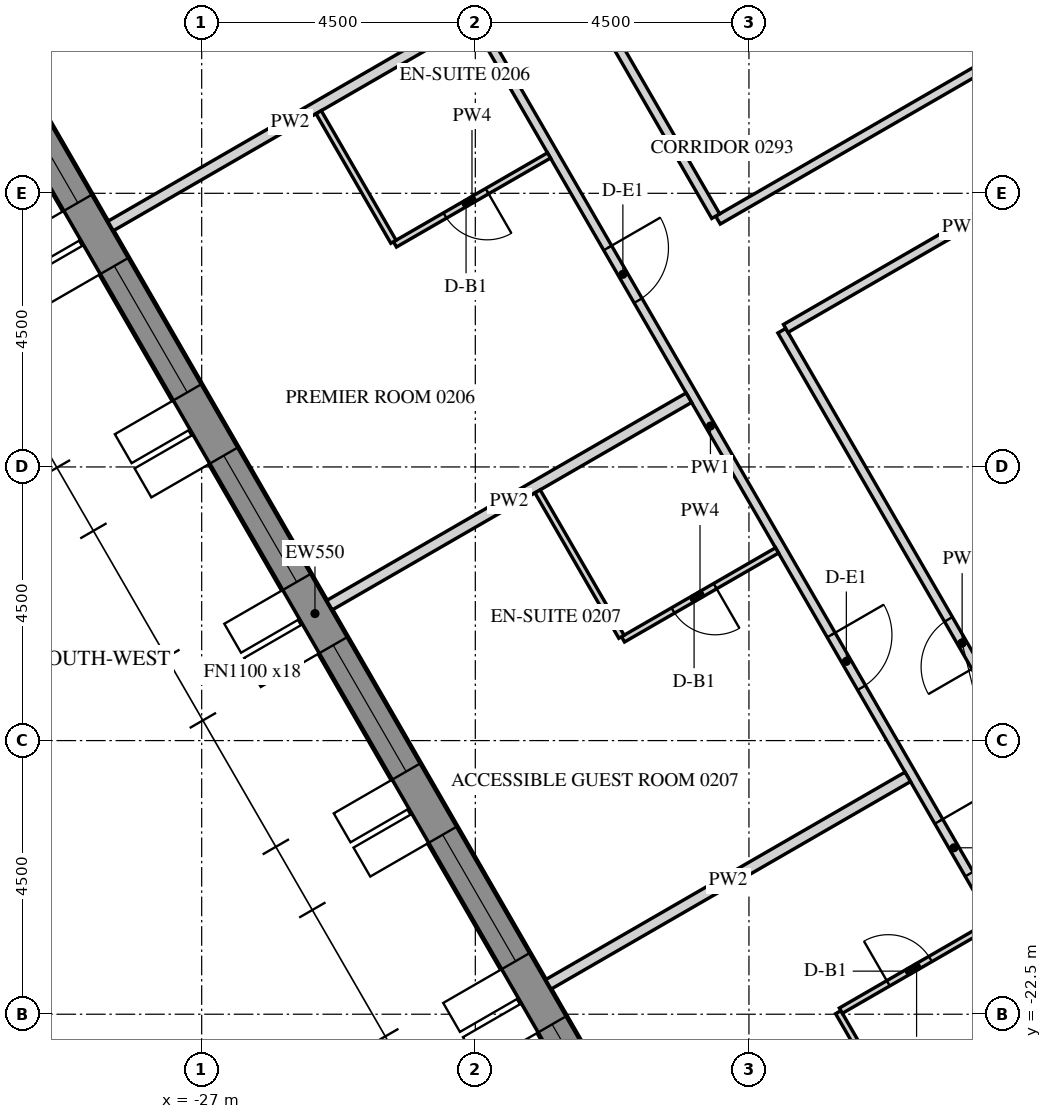
"""IFC4 building model, lengths in metres.
Left out: names, types, materials, properties, quantities, classifications, styles, units other than length and angle.
Written with IfcOpenShell. Run it as: python <this file> out.ifc"""

import sys

from ifc_helpers import new_model, si_unit, direction, frame, frame_2d, origin, place, context, subcontext, project, spatial, polyline, rectangle, outline, extrude, element, fill, save


model = new_model("IFC4")
c1 = context("Model", 3, precision=1e-05, world=origin(), true_north=direction((0.0, 1.0)))
c2 = subcontext(c1, "Body", "Model", "MODEL_VIEW")
j1 = project(units=[si_unit("LENGTHUNIT", "METRE"), si_unit("PLANEANGLEUNIT", "RADIAN")], contexts=[c1])
p1 = place(None, origin())
s1 = spatial("IfcSite", under=j1, at=p1, CompositionType="ELEMENT")
p2 = place(p1, origin())
s2 = spatial("IfcBuilding", under=s1, at=p2, CompositionType="ELEMENT")
p3 = place(p2, frame((0.0, 0.0, 49.2)))
s3 = spatial("IfcBuildingStorey", under=s2, at=p3, CompositionType="ELEMENT", Elevation=49.2)
p4 = place(p3, frame((-32.655, -2.89, -0.15), z_axis=(0.0, 0.0, 1.0), x_axis=(0.499997711317, -0.866026725152, 0.0)))
e1 = element("IfcWall", 1, at=p4, inside=s3, PredefinedType="SOLIDWALL", context=c2, shape_type="SweptSolid", body=[
    extrude(outline(polyline([(-0.022, -0.275), (30.097, -0.275), (30.045, 0.275), (0.022, 0.275), (-0.022, -0.275)])), origin(), (0.0, 0.0, 1.0), 3.9),
])
p5 = place(p4, frame((1.236, 0.0, 1.05)))
e2 = element("IfcOpeningElement", 2, at=p5, cuts=e1, PredefinedType="OPENING", context=c2, shape_type="SweptSolid", body=[
    extrude(rectangle(XDim=2.4, YDim=2.4, at=frame_2d((1.2, 1.2))), frame((0.0, 0.285, 0.0), z_axis=(0.0, -1.0, 0.0), x_axis=(1.0, 0.0, 0.0)), (0.0, 0.0, 1.0), 0.57),
])
p6 = place(p4, frame((4.835, 0.0, 1.05)))
e3 = element("IfcOpeningElement", 3, at=p6, cuts=e1, PredefinedType="OPENING", context=c2, shape_type="SweptSolid", body=[
    extrude(rectangle(XDim=2.4, YDim=2.4, at=frame_2d((1.2, 1.2))), frame((0.0, 0.285, 0.0), z_axis=(0.0, -1.0, 0.0), x_axis=(1.0, 0.0, 0.0)), (0.0, 0.0, 1.0), 0.57),
])
p7 = place(p4, frame((8.436, 0.0, 1.05)))
e4 = element("IfcOpeningElement", 4, at=p7, cuts=e1, PredefinedType="OPENING", context=c2, shape_type="SweptSolid", body=[
    extrude(rectangle(XDim=2.4, YDim=2.4, at=frame_2d((1.2, 1.2))), frame((0.0, 0.285, 0.0), z_axis=(0.0, -1.0, 0.0), x_axis=(1.0, 0.0, 0.0)), (0.0, 0.0, 1.0), 0.57),
])
p8 = place(p4, frame((12.035, 0.0, 1.05)))
e5 = element("IfcOpeningElement", 5, at=p8, cuts=e1, PredefinedType="OPENING", context=c2, shape_type="SweptSolid", body=[
    extrude(rectangle(XDim=2.4, YDim=2.4, at=frame_2d((1.2, 1.2))), frame((0.0, 0.285, 0.0), z_axis=(0.0, -1.0, 0.0), x_axis=(1.0, 0.0, 0.0)), (0.0, 0.0, 1.0), 0.57),
])
p9 = place(p4, frame((15.635, 0.0, 1.05)))
e6 = element("IfcOpeningElement", 6, at=p9, cuts=e1, PredefinedType="OPENING", context=c2, shape_type="SweptSolid", body=[
    extrude(rectangle(XDim=2.4, YDim=2.4, at=frame_2d((1.2, 1.2))), frame((0.0, 0.285, 0.0), z_axis=(0.0, -1.0, 0.0), x_axis=(1.0, 0.0, 0.0)), (0.0, 0.0, 1.0), 0.57),
])
p10 = place(p4, frame((19.236, 0.0, 1.05)))
e7 = element("IfcOpeningElement", 7, at=p10, cuts=e1, PredefinedType="OPENING", context=c2, shape_type="SweptSolid", body=[
    extrude(rectangle(XDim=2.4, YDim=2.4, at=frame_2d((1.2, 1.2))), frame((0.0, 0.285, 0.0), z_axis=(0.0, -1.0, 0.0), x_axis=(1.0, 0.0, 0.0)), (0.0, 0.0, 1.0), 0.57),
])
p11 = place(p4, frame((22.835, 0.0, 1.05)))
e8 = element("IfcOpeningElement", 8, at=p11, cuts=e1, PredefinedType="OPENING", context=c2, shape_type="SweptSolid", body=[
    extrude(rectangle(XDim=2.4, YDim=2.4, at=frame_2d((1.2, 1.2))), frame((0.0, 0.285, 0.0), z_axis=(0.0, -1.0, 0.0), x_axis=(1.0, 0.0, 0.0)), (0.0, 0.0, 1.0), 0.57),
])
p12 = place(p4, frame((26.436, 0.0, 1.05)))
e9 = element("IfcOpeningElement", 9, at=p12, cuts=e1, PredefinedType="OPENING", context=c2, shape_type="SweptSolid", body=[
    extrude(rectangle(XDim=2.4, YDim=2.4, at=frame_2d((1.2, 1.2))), frame((0.0, 0.285, 0.0), z_axis=(0.0, -1.0, 0.0), x_axis=(1.0, 0.0, 0.0)), (0.0, 0.0, 1.0), 0.57),
])
p13 = place(p3, frame((-15.819, 0.0, -0.15), z_axis=(0.0, 0.0, 1.0), x_axis=(0.499999880136, -0.866025472988, 0.0)))
e10 = element("IfcWall", 10, at=p13, inside=s3, PredefinedType="SHEAR", context=c2, shape_type="SweptSolid", body=[
    extrude(outline(polyline([(-0.173, -0.3), (15.993, -0.3), (15.646, 0.3), (0.173, 0.3), (-0.173, -0.3)])), origin(), (0.0, 0.0, 1.0), 3.9),
])
p14 = place(p13, frame((6.981, 0.0, 0.15)))
e11 = element("IfcOpeningElement", 11, at=p14, cuts=e10, PredefinedType="OPENING", context=c2, shape_type="SweptSolid", body=[
    extrude(rectangle(XDim=1.8, YDim=2.4, at=frame_2d((0.9, 1.2))), frame((0.0, 0.31, 0.0), z_axis=(0.0, -1.0, 0.0), x_axis=(1.0, 0.0, 0.0)), (0.0, 0.0, 1.0), 0.62),
])
p15 = place(p3, frame((-24.783, -2.175, 0.0), z_axis=(0.0, 0.0, 1.0), x_axis=(0.500001098408, -0.866024769617, 0.0)))
e12 = element("IfcWall", 12, at=p15, inside=s3, PredefinedType="PARTITIONING", context=c2, shape_type="SweptSolid", body=[
    extrude(rectangle(XDim=24.599, YDim=0.15, at=frame_2d((12.299, 0.0))), origin(), (0.0, 0.0, 1.0), 2.988),
])
p16 = place(p15, frame((2.816, 0.0, 0.0)))
e13 = element("IfcOpeningElement", 13, at=p16, cuts=e12, PredefinedType="OPENING", context=c2, shape_type="SweptSolid", body=[
    extrude(rectangle(XDim=1.0, YDim=2.1, at=frame_2d((0.5, 1.05))), frame((0.0, 0.085, 0.0), z_axis=(0.0, -1.0, 0.0), x_axis=(1.0, 0.0, 0.0)), (0.0, 0.0, 1.0), 0.17),
])
p17 = place(p15, frame((8.919, 0.0, 0.0)))
e14 = element("IfcOpeningElement", 14, at=p17, cuts=e12, PredefinedType="OPENING", context=c2, shape_type="SweptSolid", body=[
    extrude(rectangle(XDim=1.0, YDim=2.1, at=frame_2d((0.5, 1.05))), frame((0.0, 0.085, 0.0), z_axis=(0.0, -1.0, 0.0), x_axis=(1.0, 0.0, 0.0)), (0.0, 0.0, 1.0), 0.17),
])
p18 = place(p15, frame((16.269, 0.0, 0.0)))
e15 = element("IfcOpeningElement", 15, at=p18, cuts=e12, PredefinedType="OPENING", context=c2, shape_type="SweptSolid", body=[
    extrude(rectangle(XDim=1.0, YDim=2.1, at=frame_2d((0.5, 1.05))), frame((0.0, 0.085, 0.0), z_axis=(0.0, -1.0, 0.0), x_axis=(1.0, 0.0, 0.0)), (0.0, 0.0, 1.0), 0.17),
])
p19 = place(p15, frame((19.809, 0.0, 0.0)))
e16 = element("IfcOpeningElement", 16, at=p19, cuts=e12, PredefinedType="OPENING", context=c2, shape_type="SweptSolid", body=[
    extrude(rectangle(XDim=1.0, YDim=2.1, at=frame_2d((0.5, 1.05))), frame((0.0, 0.085, 0.0), z_axis=(0.0, -1.0, 0.0), x_axis=(1.0, 0.0, 0.0)), (0.0, 0.0, 1.0), 0.17),
])
p20 = place(p3, frame((-12.664, -6.066, 0.0), z_axis=(0.0, 0.0, 1.0), x_axis=(-0.866026575979, -0.499997969693, 0.0)))
e17 = element("IfcWall", 17, at=p20, inside=s3, PredefinedType="PARTITIONING", context=c2, shape_type="SweptSolid", body=[
    extrude(rectangle(XDim=6.75, YDim=0.15, at=frame_2d((3.375, 0.0))), origin(), (0.0, 0.0, 1.0), 2.988),
])
p21 = place(p3, frame((-18.547, -9.376, 0.0), z_axis=(0.0, 0.0, 1.0), x_axis=(-0.500002473902, 0.866023975472, 0.0)))
e18 = element("IfcWall", 18, at=p21, inside=s3, PredefinedType="PARTITIONING", context=c2, shape_type="SweptSolid", body=[
    extrude(rectangle(XDim=8.679, YDim=0.15, at=frame_2d((4.34, 0.0))), origin(), (0.0, 0.0, 1.0), 2.988),
])
p22 = place(p21, frame((3.89, 0.0, 0.0)))
e19 = element("IfcOpeningElement", 19, at=p22, cuts=e18, PredefinedType="OPENING", context=c2, shape_type="SweptSolid", body=[
    extrude(rectangle(XDim=0.9, YDim=2.1, at=frame_2d((0.45, 1.05))), frame((0.0, 0.085, 0.0), z_axis=(0.0, -1.0, 0.0), x_axis=(1.0, 0.0, 0.0)), (0.0, 0.0, 1.0), 0.17),
])
p23 = place(p3, frame((-11.529, -21.532, 0.0), z_axis=(0.0, 0.0, 1.0), x_axis=(-0.499990893337, 0.866030661455, 0.0)))
e20 = element("IfcWall", 20, at=p23, inside=s3, PredefinedType="PARTITIONING", context=c2, shape_type="SweptSolid", body=[
    extrude(rectangle(XDim=11.862, YDim=0.15, at=frame_2d((5.931, 0.0))), origin(), (0.0, 0.0, 1.0), 2.988),
])
p24 = place(p23, frame((5.481, 0.0, 0.0)))
e21 = element("IfcOpeningElement", 21, at=p24, cuts=e20, PredefinedType="OPENING", context=c2, shape_type="SweptSolid", body=[
    extrude(rectangle(XDim=0.9, YDim=2.1, at=frame_2d((0.45, 1.05))), frame((0.0, 0.085, 0.0), z_axis=(0.0, -1.0, 0.0), x_axis=(1.0, 0.0, 0.0)), (0.0, 0.0, 1.0), 0.17),
])
p25 = place(p3, frame((-17.395, -11.222, 0.0), z_axis=(0.0, 0.0, 1.0), x_axis=(0.86601747984, 0.500013724423, 0.0)))
e22 = element("IfcWall", 22, at=p25, inside=s3, PredefinedType="PARTITIONING", context=c2, shape_type="SweptSolid", body=[
    extrude(rectangle(XDim=6.675, YDim=0.15, at=frame_2d((3.337, 0.0))), origin(), (0.0, 0.0, 1.0), 2.988),
])
p26 = place(p3, frame((-28.499, -9.538, 0.0), z_axis=(0.0, 0.0, 1.0), x_axis=(0.866035472144, 0.499982560684, 0.0)))
e23 = element("IfcWall", 23, at=p26, inside=s3, PredefinedType="PARTITIONING", context=c2, shape_type="SweptSolid", body=[
    extrude(rectangle(XDim=6.825, YDim=0.18, at=frame_2d((3.413, 0.0))), origin(), (0.0, 0.0, 1.0), 2.988),
])
p27 = place(p3, frame((-21.288, -8.378, 0.0), z_axis=(0.0, 0.0, 1.0), x_axis=(-0.866046596414, -0.499963291492, 0.0)))
e24 = element("IfcWall", 24, at=p27, inside=s3, PredefinedType="PARTITIONING", context=c2, shape_type="SweptSolid", body=[
    extrude(rectangle(XDim=2.925, YDim=0.1, at=frame_2d((1.462, 0.0))), origin(), (0.0, 0.0, 1.0), 2.988),
])
p28 = place(p27, frame((1.175, 0.0, 0.0)))
e25 = element("IfcOpeningElement", 25, at=p28, cuts=e24, PredefinedType="OPENING", context=c2, shape_type="SweptSolid", body=[
    extrude(rectangle(XDim=0.8, YDim=2.1, at=frame_2d((0.4, 1.05))), frame((0.0, 0.06, 0.0), z_axis=(0.0, -1.0, 0.0), x_axis=(1.0, 0.0, 0.0)), (0.0, 0.0, 1.0), 0.12),
])
p29 = place(p3, frame((-23.846, -9.797, 0.0), z_axis=(0.0, 0.0, 1.0), x_axis=(-0.499960120811, 0.86604842682, 0.0)))
e26 = element("IfcWall", 26, at=p29, inside=s3, PredefinedType="PARTITIONING", context=c2, shape_type="SweptSolid", body=[
    extrude(rectangle(XDim=2.46, YDim=0.1, at=frame_2d((1.23, 0.0))), origin(), (0.0, 0.0, 1.0), 2.988),
])
p30 = place(p3, frame((-24.899, -15.774, 0.0), z_axis=(0.0, 0.0, 1.0), x_axis=(0.866035472144, 0.499982560684, 0.0)))
e27 = element("IfcWall", 27, at=p30, inside=s3, PredefinedType="PARTITIONING", context=c2, shape_type="SweptSolid", body=[
    extrude(rectangle(XDim=6.825, YDim=0.18, at=frame_2d((3.413, 0.0))), origin(), (0.0, 0.0, 1.0), 2.988),
])
p31 = place(p3, frame((-17.538, -14.873, 0.0), z_axis=(0.0, 0.0, 1.0), x_axis=(-0.866046596414, -0.499963291492, 0.0)))
e28 = element("IfcWall", 28, at=p31, inside=s3, PredefinedType="PARTITIONING", context=c2, shape_type="SweptSolid", body=[
    extrude(rectangle(XDim=2.925, YDim=0.1, at=frame_2d((1.462, 0.0))), origin(), (0.0, 0.0, 1.0), 2.988),
])
p32 = place(p31, frame((1.175, 0.0, 0.0)))
e29 = element("IfcOpeningElement", 29, at=p32, cuts=e28, PredefinedType="OPENING", context=c2, shape_type="SweptSolid", body=[
    extrude(rectangle(XDim=0.8, YDim=2.1, at=frame_2d((0.4, 1.05))), frame((0.0, 0.06, 0.0), z_axis=(0.0, -1.0, 0.0), x_axis=(1.0, 0.0, 0.0)), (0.0, 0.0, 1.0), 0.12),
])
p33 = place(p3, frame((-20.096, -16.292, 0.0), z_axis=(0.0, 0.0, 1.0), x_axis=(-0.499982807329, 0.86603532975, 0.0)))
e30 = element("IfcWall", 30, at=p33, inside=s3, PredefinedType="PARTITIONING", context=c2, shape_type="SweptSolid", body=[
    extrude(rectangle(XDim=2.76, YDim=0.1, at=frame_2d((1.38, 0.0))), origin(), (0.0, 0.0, 1.0), 2.988),
])
p34 = place(p3, frame((-21.299, -22.009, 0.0), z_axis=(0.0, 0.0, 1.0), x_axis=(0.866019982719, 0.500009389444, 0.0)))
e31 = element("IfcWall", 31, at=p34, inside=s3, PredefinedType="PARTITIONING", context=c2, shape_type="SweptSolid", body=[
    extrude(rectangle(XDim=6.825, YDim=0.18, at=frame_2d((3.413, 0.0))), origin(), (0.0, 0.0, 1.0), 2.988),
])
p35 = place(p3, frame((-15.106, -24.935, 0.0), z_axis=(0.0, 0.0, 1.0), x_axis=(-0.500036373335, 0.866004402611, 0.0)))
e32 = element("IfcWall", 32, at=p35, inside=s3, PredefinedType="PARTITIONING", context=c2, shape_type="SweptSolid", body=[
    extrude(rectangle(XDim=2.85, YDim=0.1, at=frame_2d((1.425, 0.0))), origin(), (0.0, 0.0, 1.0), 2.988),
])
p36 = place(p3, frame((-16.488, -22.441, 0.0), z_axis=(0.0, 0.0, 1.0), x_axis=(0.866018712932, 0.500011588718, 0.0)))
e33 = element("IfcWall", 33, at=p36, inside=s3, PredefinedType="PARTITIONING", context=c2, shape_type="SweptSolid", body=[
    extrude(rectangle(XDim=2.875, YDim=0.1, at=frame_2d((1.438, 0.0))), origin(), (0.0, 0.0, 1.0), 2.988),
])
p37 = place(p36, frame((0.9, 0.0, 0.0)))
e34 = element("IfcOpeningElement", 34, at=p37, cuts=e33, PredefinedType="OPENING", context=c2, shape_type="SweptSolid", body=[
    extrude(rectangle(XDim=0.8, YDim=2.1, at=frame_2d((0.4, 1.05))), frame((0.0, 0.06, 0.0), z_axis=(0.0, -1.0, 0.0), x_axis=(1.0, 0.0, 0.0)), (0.0, 0.0, 1.0), 0.12),
])
p38 = place(p6, frame((0.0, 0.205, 0.0)))
e35 = element("IfcWindow", 35, at=p38, inside=s3, PartitioningType="DOUBLE_PANEL_VERTICAL", PredefinedType="WINDOW", context=c2, shape_type="SweptSolid", body=[
    extrude(rectangle(XDim=2.4, YDim=2.4, at=frame_2d((1.2, 1.2))), frame((0.0, 0.03, 0.0), z_axis=(0.0, -1.0, 0.0), x_axis=(1.0, 0.0, 0.0)), (0.0, 0.0, 1.0), 0.06),
])
fill(e3, e35)
p39 = place(p7, frame((0.0, 0.205, 0.0)))
e36 = element("IfcWindow", 36, at=p39, inside=s3, PartitioningType="DOUBLE_PANEL_VERTICAL", PredefinedType="WINDOW", context=c2, shape_type="SweptSolid", body=[
    extrude(rectangle(XDim=2.4, YDim=2.4, at=frame_2d((1.2, 1.2))), frame((0.0, 0.03, 0.0), z_axis=(0.0, -1.0, 0.0), x_axis=(1.0, 0.0, 0.0)), (0.0, 0.0, 1.0), 0.06),
])
fill(e4, e36)
p40 = place(p8, frame((0.0, 0.205, 0.0)))
e37 = element("IfcWindow", 37, at=p40, inside=s3, PartitioningType="DOUBLE_PANEL_VERTICAL", PredefinedType="WINDOW", context=c2, shape_type="SweptSolid", body=[
    extrude(rectangle(XDim=2.4, YDim=2.4, at=frame_2d((1.2, 1.2))), frame((0.0, 0.03, 0.0), z_axis=(0.0, -1.0, 0.0), x_axis=(1.0, 0.0, 0.0)), (0.0, 0.0, 1.0), 0.06),
])
fill(e5, e37)
p41 = place(p9, frame((0.0, 0.205, 0.0)))
e38 = element("IfcWindow", 38, at=p41, inside=s3, PartitioningType="DOUBLE_PANEL_VERTICAL", PredefinedType="WINDOW", context=c2, shape_type="SweptSolid", body=[
    extrude(rectangle(XDim=2.4, YDim=2.4, at=frame_2d((1.2, 1.2))), frame((0.0, 0.03, 0.0), z_axis=(0.0, -1.0, 0.0), x_axis=(1.0, 0.0, 0.0)), (0.0, 0.0, 1.0), 0.06),
])
fill(e6, e38)
p42 = place(p10, frame((0.0, 0.205, 0.0)))
e39 = element("IfcWindow", 39, at=p42, inside=s3, PartitioningType="DOUBLE_PANEL_VERTICAL", PredefinedType="WINDOW", context=c2, shape_type="SweptSolid", body=[
    extrude(rectangle(XDim=2.4, YDim=2.4, at=frame_2d((1.2, 1.2))), frame((0.0, 0.03, 0.0), z_axis=(0.0, -1.0, 0.0), x_axis=(1.0, 0.0, 0.0)), (0.0, 0.0, 1.0), 0.06),
])
fill(e7, e39)
p43 = place(p11, frame((0.0, 0.205, 0.0)))
e40 = element("IfcWindow", 40, at=p43, inside=s3, PartitioningType="DOUBLE_PANEL_VERTICAL", PredefinedType="WINDOW", context=c2, shape_type="SweptSolid", body=[
    extrude(rectangle(XDim=2.4, YDim=2.4, at=frame_2d((1.2, 1.2))), frame((0.0, 0.03, 0.0), z_axis=(0.0, -1.0, 0.0), x_axis=(1.0, 0.0, 0.0)), (0.0, 0.0, 1.0), 0.06),
])
fill(e8, e40)
p44 = place(p17, origin())
e41 = element("IfcDoor", 41, at=p44, inside=s3, OperationType="SINGLE_SWING_LEFT", PredefinedType="DOOR", context=c2, shape_type="SweptSolid", body=[
    extrude(rectangle(XDim=1.0, YDim=2.1, at=frame_2d((0.5, 1.05))), frame((0.0, 0.025, 0.0), z_axis=(0.0, -1.0, 0.0), x_axis=(1.0, 0.0, 0.0)), (0.0, 0.0, 1.0), 0.05),
])
fill(e14, e41)
p45 = place(p28, origin())
e42 = element("IfcDoor", 42, at=p45, inside=s3, OperationType="SINGLE_SWING_LEFT", PredefinedType="DOOR", context=c2, shape_type="SweptSolid", body=[
    extrude(rectangle(XDim=0.8, YDim=2.1, at=frame_2d((0.4, 1.05))), frame((0.0, 0.025, 0.0), z_axis=(0.0, -1.0, 0.0), x_axis=(1.0, 0.0, 0.0)), (0.0, 0.0, 1.0), 0.05),
])
fill(e25, e42)
p46 = place(p18, origin())
e43 = element("IfcDoor", 43, at=p46, inside=s3, OperationType="SINGLE_SWING_LEFT", PredefinedType="DOOR", context=c2, shape_type="SweptSolid", body=[
    extrude(rectangle(XDim=1.0, YDim=2.1, at=frame_2d((0.5, 1.05))), frame((0.0, 0.025, 0.0), z_axis=(0.0, -1.0, 0.0), x_axis=(1.0, 0.0, 0.0)), (0.0, 0.0, 1.0), 0.05),
])
fill(e15, e43)
p47 = place(p32, origin())
e44 = element("IfcDoor", 44, at=p47, inside=s3, OperationType="SINGLE_SWING_LEFT", PredefinedType="DOOR", context=c2, shape_type="SweptSolid", body=[
    extrude(rectangle(XDim=0.8, YDim=2.1, at=frame_2d((0.4, 1.05))), frame((0.0, 0.025, 0.0), z_axis=(0.0, -1.0, 0.0), x_axis=(1.0, 0.0, 0.0)), (0.0, 0.0, 1.0), 0.05),
])
fill(e29, e44)
p48 = place(p19, origin())
e45 = element("IfcDoor", 45, at=p48, inside=s3, OperationType="SINGLE_SWING_RIGHT", PredefinedType="DOOR", context=c2, shape_type="SweptSolid", body=[
    extrude(rectangle(XDim=1.0, YDim=2.1, at=frame_2d((0.5, 1.05))), frame((0.0, 0.025, 0.0), z_axis=(0.0, -1.0, 0.0), x_axis=(1.0, 0.0, 0.0)), (0.0, 0.0, 1.0), 0.05),
])
fill(e16, e45)
p49 = place(p37, origin())
e46 = element("IfcDoor", 46, at=p49, inside=s3, OperationType="SINGLE_SWING_RIGHT", PredefinedType="DOOR", context=c2, shape_type="SweptSolid", body=[
    extrude(rectangle(XDim=0.8, YDim=2.1, at=frame_2d((0.4, 1.05))), frame((0.0, 0.025, 0.0), z_axis=(0.0, -1.0, 0.0), x_axis=(1.0, 0.0, 0.0)), (0.0, 0.0, 1.0), 0.05),
])
fill(e34, e46)
p50 = place(p24, origin())
e47 = element("IfcDoor", 47, at=p50, inside=s3, OperationType="SINGLE_SWING_RIGHT", PredefinedType="DOOR", context=c2, shape_type="SweptSolid", body=[
    extrude(rectangle(XDim=0.9, YDim=2.1, at=frame_2d((0.45, 1.05))), frame((0.0, 0.025, 0.0), z_axis=(0.0, -1.0, 0.0), x_axis=(1.0, 0.0, 0.0)), (0.0, 0.0, 1.0), 0.05),
])
fill(e21, e47)
save(model, sys.argv[1])
